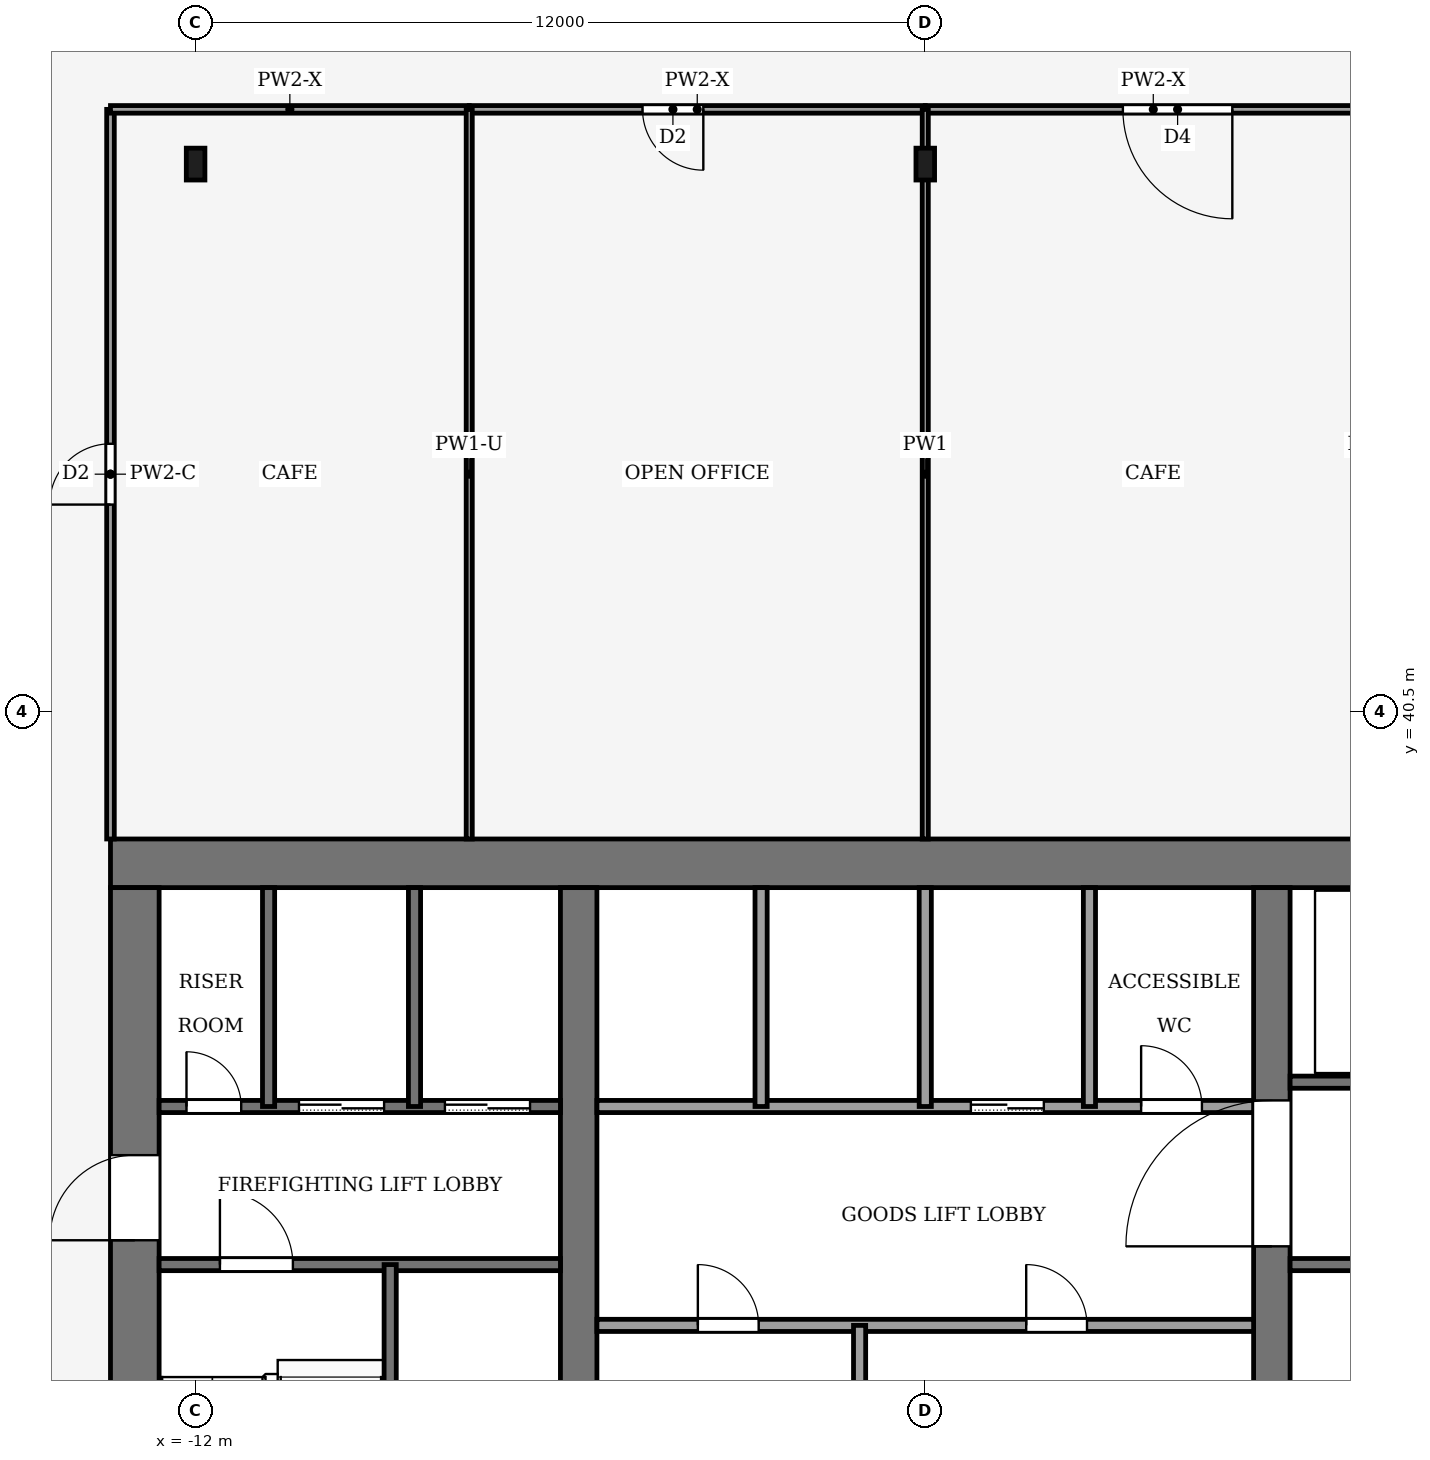
"""IFC4 building model, lengths in metres.
Left out: names, types, materials, properties, quantities, classifications, styles, units other than length and angle.
Written with IfcOpenShell. Run it as: python <this file> out.ifc"""

import sys

from ifc_helpers import new_model, si_unit, direction, frame, frame_2d, origin, origin_2d, place, context, subcontext, project, spatial, rectangle, i_section, extrude, element, fill, save


model = new_model("IFC4")
c1 = context("Model", 3, precision=1e-05, world=origin(), true_north=direction((0.0, 1.0)))
c2 = subcontext(c1, "Body", "Model", "MODEL_VIEW")
j1 = project(units=[si_unit("LENGTHUNIT", "METRE"), si_unit("PLANEANGLEUNIT", "RADIAN")], contexts=[c1])
p1 = place(None, origin())
s1 = spatial("IfcSite", under=j1, at=p1, CompositionType="ELEMENT")
p2 = place(p1, origin())
s2 = spatial("IfcBuilding", under=s1, at=p2, CompositionType="ELEMENT")
p3 = place(p2, frame((0.0, 0.0, 233.0)))
s3 = spatial("IfcBuildingStorey", under=s2, at=p3, CompositionType="ELEMENT", Elevation=233.0)
p4 = place(p3, frame((-13.4, 38.0, -0.13), z_axis=(0.0, 0.0, 1.0), x_axis=(1.0, 0.0, 0.0)))
e1 = element("IfcWall", 1, at=p4, inside=s3, PredefinedType="SHEAR", context=c2, shape_type="SweptSolid", body=[
    extrude(rectangle(XDim=26.8, YDim=0.8, at=frame_2d((13.4, 0.0))), origin(), (0.0, 0.0, 1.0), 5.0),
])
p5 = place(p3, frame((-13.0, 18.4, -0.13), z_axis=(0.0, 0.0, 1.0), x_axis=(0.0, 1.0, 0.0)))
e2 = element("IfcWall", 2, at=p5, inside=s3, PredefinedType="SHEAR", context=c2, shape_type="SweptSolid", body=[
    extrude(rectangle(XDim=19.2, YDim=0.8, at=frame_2d((9.6, 0.0))), origin(), (0.0, 0.0, 1.0), 5.0),
])
p6 = place(p5, frame((2.8, 0.0, 0.13)))
e3 = element("IfcOpeningElement", 3, at=p6, cuts=e2, PredefinedType="OPENING", context=c2, shape_type="SweptSolid", body=[
    extrude(rectangle(XDim=2.4, YDim=2.4, at=frame_2d((1.2, 1.2))), frame((0.0, 0.41, 0.0), z_axis=(0.0, -1.0, 0.0), x_axis=(1.0, 0.0, 0.0)), (0.0, 0.0, 1.0), 0.82),
])
p7 = place(p5, frame((13.4, 0.0, 0.13)))
e4 = element("IfcOpeningElement", 4, at=p7, cuts=e2, PredefinedType="OPENING", context=c2, shape_type="SweptSolid", body=[
    extrude(rectangle(XDim=1.4, YDim=2.2, at=frame_2d((0.7, 1.1))), frame((0.0, 0.41, 0.0), z_axis=(0.0, -1.0, 0.0), x_axis=(1.0, 0.0, 0.0)), (0.0, 0.0, 1.0), 0.82),
])
p8 = place(p3, frame((-5.7, 18.4, -0.13), z_axis=(0.0, 0.0, 1.0), x_axis=(0.0, 1.0, 0.0)))
e5 = element("IfcWall", 5, at=p8, inside=s3, PredefinedType="SHEAR", context=c2, shape_type="SweptSolid", body=[
    extrude(rectangle(XDim=19.2, YDim=0.6, at=frame_2d((9.6, 0.0))), origin(), (0.0, 0.0, 1.0), 5.0),
])
p9 = place(p8, frame((8.35, 0.0, 0.13)))
e6 = element("IfcOpeningElement", 6, at=p9, cuts=e5, PredefinedType="OPENING", context=c2, shape_type="SweptSolid", body=[
    extrude(rectangle(XDim=0.9, YDim=2.1, at=frame_2d((0.45, 1.05))), frame((0.0, 0.31, 0.0), z_axis=(0.0, -1.0, 0.0), x_axis=(1.0, 0.0, 0.0)), (0.0, 0.0, 1.0), 0.62),
])
p10 = place(p3, frame((5.7, 18.4, -0.13), z_axis=(0.0, 0.0, 1.0), x_axis=(0.0, 1.0, 0.0)))
e7 = element("IfcWall", 7, at=p10, inside=s3, PredefinedType="SHEAR", context=c2, shape_type="SweptSolid", body=[
    extrude(rectangle(XDim=19.2, YDim=0.6, at=frame_2d((9.6, 0.0))), origin(), (0.0, 0.0, 1.0), 5.0),
])
p11 = place(p10, frame((13.3, 0.0, 0.13)))
e8 = element("IfcOpeningElement", 8, at=p11, cuts=e7, PredefinedType="OPENING", context=c2, shape_type="SweptSolid", body=[
    extrude(rectangle(XDim=2.4, YDim=2.4, at=frame_2d((1.2, 1.2))), frame((0.0, 0.31, 0.0), z_axis=(0.0, -1.0, 0.0), x_axis=(1.0, 0.0, 0.0)), (0.0, 0.0, 1.0), 0.62),
])
for number, where, z_axis, x_axis in (
    (9, (-12.0, 49.5, 0.0), (0.0, 0.0, 1.0), (1.0, 0.0, 0.0)),
    (10, (0.0, 49.5, 0.0), (0.0, 0.0, 1.0), (1.0, 0.0, 0.0)),
):
    element("IfcColumn", number, at=place(p3, frame(where, z_axis=z_axis, x_axis=x_axis)), inside=s3, PredefinedType="COLUMN", context=c2, shape_type="SweptSolid", body=[
        extrude(i_section(OverallWidth=0.306, OverallDepth=0.524, WebThickness=0.012, FlangeThickness=0.04, FilletRadius=0.027, at=origin_2d()), origin(), (0.0, 0.0, 1.0), 5.0),
    ])
p12 = place(p3, frame((-5.4, 30.4, 0.0), z_axis=(0.0, 0.0, 1.0), x_axis=(1.0, 0.0, 0.0)))
e11 = element("IfcWall", 11, at=p12, inside=s3, PredefinedType="PARTITIONING", context=c2, shape_type="SweptSolid", body=[
    extrude(rectangle(XDim=10.8, YDim=0.2, at=frame_2d((5.4, 0.0))), origin(), (0.0, 0.0, 1.0), 4.87),
])
p13 = place(p12, frame((1.66, 0.0, 0.0)))
e12 = element("IfcOpeningElement", 12, at=p13, cuts=e11, PredefinedType="OPENING", context=c2, shape_type="SweptSolid", body=[
    extrude(rectangle(XDim=1.0, YDim=2.1, at=frame_2d((0.5, 1.05))), frame((0.0, 0.11, 0.0), z_axis=(0.0, -1.0, 0.0), x_axis=(1.0, 0.0, 0.0)), (0.0, 0.0, 1.0), 0.22),
])
p14 = place(p12, frame((7.06, 0.0, 0.0)))
e13 = element("IfcOpeningElement", 13, at=p14, cuts=e11, PredefinedType="OPENING", context=c2, shape_type="SweptSolid", body=[
    extrude(rectangle(XDim=1.0, YDim=2.1, at=frame_2d((0.5, 1.05))), frame((0.0, 0.11, 0.0), z_axis=(0.0, -1.0, 0.0), x_axis=(1.0, 0.0, 0.0)), (0.0, 0.0, 1.0), 0.22),
])
p15 = place(p3, frame((-12.6, 31.4, 0.0), z_axis=(0.0, 0.0, 1.0), x_axis=(1.0, 0.0, 0.0)))
e14 = element("IfcWall", 14, at=p15, inside=s3, PredefinedType="PARTITIONING", context=c2, shape_type="SweptSolid", body=[
    extrude(rectangle(XDim=6.6, YDim=0.2, at=frame_2d((3.3, 0.0))), origin(), (0.0, 0.0, 1.0), 4.87),
])
p16 = place(p15, frame((1.0, 0.0, 0.0)))
e15 = element("IfcOpeningElement", 15, at=p16, cuts=e14, PredefinedType="OPENING", context=c2, shape_type="SweptSolid", body=[
    extrude(rectangle(XDim=1.2, YDim=2.2, at=frame_2d((0.6, 1.1))), frame((0.0, 0.11, 0.0), z_axis=(0.0, -1.0, 0.0), x_axis=(1.0, 0.0, 0.0)), (0.0, 0.0, 1.0), 0.22),
])
p17 = place(p3, frame((6.0, 31.4, 0.0), z_axis=(0.0, 0.0, 1.0), x_axis=(1.0, 0.0, 0.0)))
e16 = element("IfcWall", 16, at=p17, inside=s3, PredefinedType="PARTITIONING", context=c2, shape_type="SweptSolid", body=[
    extrude(rectangle(XDim=6.6, YDim=0.2, at=frame_2d((3.3, 0.0))), origin(), (0.0, 0.0, 1.0), 4.87),
])
p18 = place(p3, frame((-12.6, 34.0, 0.0), z_axis=(0.0, 0.0, 1.0), x_axis=(1.0, 0.0, 0.0)))
e17 = element("IfcWall", 17, at=p18, inside=s3, PredefinedType="PARTITIONING", context=c2, shape_type="SweptSolid", body=[
    extrude(rectangle(XDim=6.6, YDim=0.2, at=frame_2d((3.3, 0.0))), origin(), (0.0, 0.0, 1.0), 4.87),
])
p19 = place(p18, frame((4.7, 0.0, 0.0)))
e18 = element("IfcOpeningElement", 18, at=p19, cuts=e17, PredefinedType="OPENING", context=c2, shape_type="SweptSolid", body=[
    extrude(rectangle(XDim=1.4, YDim=2.2, at=frame_2d((0.7, 1.1))), frame((0.0, 0.11, 0.0), z_axis=(0.0, -1.0, 0.0), x_axis=(1.0, 0.0, 0.0)), (0.0, 0.0, 1.0), 0.22),
])
p20 = place(p18, frame((2.3, 0.0, 0.0)))
e19 = element("IfcOpeningElement", 19, at=p20, cuts=e17, PredefinedType="OPENING", context=c2, shape_type="SweptSolid", body=[
    extrude(rectangle(XDim=1.4, YDim=2.2, at=frame_2d((0.7, 1.1))), frame((0.0, 0.11, 0.0), z_axis=(0.0, -1.0, 0.0), x_axis=(1.0, 0.0, 0.0)), (0.0, 0.0, 1.0), 0.22),
])
p21 = place(p18, frame((0.45, 0.0, 0.0)))
e20 = element("IfcOpeningElement", 20, at=p21, cuts=e17, PredefinedType="OPENING", context=c2, shape_type="SweptSolid", body=[
    extrude(rectangle(XDim=0.9, YDim=2.1, at=frame_2d((0.45, 1.05))), frame((0.0, 0.11, 0.0), z_axis=(0.0, -1.0, 0.0), x_axis=(1.0, 0.0, 0.0)), (0.0, 0.0, 1.0), 0.22),
])
p22 = place(p3, frame((-5.4, 34.0, 0.0), z_axis=(0.0, 0.0, 1.0), x_axis=(1.0, 0.0, 0.0)))
e21 = element("IfcWall", 21, at=p22, inside=s3, PredefinedType="PARTITIONING", context=c2, shape_type="SweptSolid", body=[
    extrude(rectangle(XDim=10.8, YDim=0.2, at=frame_2d((5.4, 0.0))), origin(), (0.0, 0.0, 1.0), 4.87),
])
p23 = place(p22, frame((6.15, 0.0, 0.0)))
e22 = element("IfcOpeningElement", 22, at=p23, cuts=e21, PredefinedType="OPENING", context=c2, shape_type="SweptSolid", body=[
    extrude(rectangle(XDim=1.2, YDim=2.2, at=frame_2d((0.6, 1.1))), frame((0.0, 0.11, 0.0), z_axis=(0.0, -1.0, 0.0), x_axis=(1.0, 0.0, 0.0)), (0.0, 0.0, 1.0), 0.22),
])
p24 = place(p22, frame((8.95, 0.0, 0.0)))
e23 = element("IfcOpeningElement", 23, at=p24, cuts=e21, PredefinedType="OPENING", context=c2, shape_type="SweptSolid", body=[
    extrude(rectangle(XDim=1.0, YDim=2.1, at=frame_2d((0.5, 1.05))), frame((0.0, 0.11, 0.0), z_axis=(0.0, -1.0, 0.0), x_axis=(1.0, 0.0, 0.0)), (0.0, 0.0, 1.0), 0.22),
])
p25 = place(p3, frame((6.0, 34.4, 0.0), z_axis=(0.0, 0.0, 1.0), x_axis=(1.0, 0.0, 0.0)))
e24 = element("IfcWall", 24, at=p25, inside=s3, PredefinedType="PARTITIONING", context=c2, shape_type="SweptSolid", body=[
    extrude(rectangle(XDim=6.6, YDim=0.2, at=frame_2d((3.3, 0.0))), origin(), (0.0, 0.0, 1.0), 4.87),
])
p26 = place(p25, frame((4.8, 0.0, 0.0)))
e25 = element("IfcOpeningElement", 25, at=p26, cuts=e24, PredefinedType="OPENING", context=c2, shape_type="SweptSolid", body=[
    extrude(rectangle(XDim=1.2, YDim=2.2, at=frame_2d((0.6, 1.1))), frame((0.0, 0.11, 0.0), z_axis=(0.0, -1.0, 0.0), x_axis=(1.0, 0.0, 0.0)), (0.0, 0.0, 1.0), 0.22),
])
p27 = place(p3, frame((-10.8, 34.0, 0.0), z_axis=(0.0, 0.0, 1.0), x_axis=(0.0, 1.0, 0.0)))
e26 = element("IfcWall", 26, at=p27, inside=s3, PredefinedType="PARTITIONING", context=c2, shape_type="SweptSolid", body=[
    extrude(rectangle(XDim=3.6, YDim=0.2, at=frame_2d((1.8, 0.0))), origin(), (0.0, 0.0, 1.0), 4.87),
])
p28 = place(p3, frame((-8.8, 24.0, 0.0), z_axis=(0.0, 0.0, 1.0), x_axis=(0.0, 1.0, 0.0)))
e27 = element("IfcWall", 27, at=p28, inside=s3, PredefinedType="PARTITIONING", context=c2, shape_type="SweptSolid", body=[
    extrude(rectangle(XDim=7.4, YDim=0.2, at=frame_2d((3.7, 0.0))), origin(), (0.0, 0.0, 1.0), 4.87),
])
for number, where, z_axis, x_axis in (
    (28, (-8.4, 34.0, 0.0), (0.0, 0.0, 1.0), (0.0, 1.0, 0.0)),
    (29, (-2.7, 34.0, 0.0), (0.0, 0.0, 1.0), (0.0, 1.0, 0.0)),
):
    element("IfcWall", number, at=place(p3, frame(where, z_axis=z_axis, x_axis=x_axis)), inside=s3, PredefinedType="PARTITIONING", context=c2, shape_type="SweptSolid", body=[
        extrude(rectangle(XDim=3.6, YDim=0.2, at=frame_2d((1.8, 0.0))), origin(), (0.0, 0.0, 1.0), 4.87),
    ])
p29 = place(p3, frame((-1.08, 28.0, 0.0), z_axis=(0.0, 0.0, 1.0), x_axis=(0.0, 1.0, 0.0)))
e30 = element("IfcWall", 30, at=p29, inside=s3, PredefinedType="PARTITIONING", context=c2, shape_type="SweptSolid", body=[
    extrude(rectangle(XDim=2.4, YDim=0.2, at=frame_2d((1.2, 0.0))), origin(), (0.0, 0.0, 1.0), 4.87),
])
for number, where, z_axis, x_axis in (
    (31, (0.0, 34.0, 0.0), (0.0, 0.0, 1.0), (0.0, 1.0, 0.0)),
    (32, (2.7, 34.0, 0.0), (0.0, 0.0, 1.0), (0.0, 1.0, 0.0)),
):
    element("IfcWall", number, at=place(p3, frame(where, z_axis=z_axis, x_axis=x_axis)), inside=s3, PredefinedType="PARTITIONING", context=c2, shape_type="SweptSolid", body=[
        extrude(rectangle(XDim=3.6, YDim=0.2, at=frame_2d((1.8, 0.0))), origin(), (0.0, 0.0, 1.0), 4.87),
    ])
p30 = place(p3, frame((-13.4, 38.4, 0.0), z_axis=(0.0, 0.0, 1.0), x_axis=(0.0, 1.0, 0.0)))
e33 = element("IfcWall", 33, at=p30, inside=s3, PredefinedType="PARTITIONING", context=c2, shape_type="SweptSolid", body=[
    extrude(rectangle(XDim=12.0, YDim=0.125, at=frame_2d((6.0, 0.0))), origin(), (0.0, 0.0, 1.0), 4.14),
])
p31 = place(p30, frame((5.5, 0.0, 0.0)))
e34 = element("IfcOpeningElement", 34, at=p31, cuts=e33, PredefinedType="OPENING", context=c2, shape_type="SweptSolid", body=[
    extrude(rectangle(XDim=1.0, YDim=2.1, at=frame_2d((0.5, 1.05))), frame((0.0, 0.073, 0.0), z_axis=(0.0, -1.0, 0.0), x_axis=(1.0, 0.0, 0.0)), (0.0, 0.0, 1.0), 0.145),
])
p32 = place(p3, frame((-7.5, 50.4, 0.0), z_axis=(0.0, 0.0, 1.0), x_axis=(-1.0, 0.0, 0.0)))
e35 = element("IfcWall", 35, at=p32, inside=s3, PredefinedType="PARTITIONING", context=c2, shape_type="SweptSolid", body=[
    extrude(rectangle(XDim=5.9, YDim=0.125, at=frame_2d((2.95, 0.0))), origin(), (0.0, 0.0, 1.0), 4.24),
])
p33 = place(p3, frame((0.0, 50.4, 0.0), z_axis=(0.0, 0.0, 1.0), x_axis=(-1.0, 0.0, 0.0)))
e36 = element("IfcWall", 36, at=p33, inside=s3, PredefinedType="PARTITIONING", context=c2, shape_type="SweptSolid", body=[
    extrude(rectangle(XDim=7.5, YDim=0.125, at=frame_2d((3.75, 0.0))), origin(), (0.0, 0.0, 1.0), 4.24),
])
p34 = place(p33, frame((3.65, 0.0, 0.0)))
e37 = element("IfcOpeningElement", 37, at=p34, cuts=e36, PredefinedType="OPENING", context=c2, shape_type="SweptSolid", body=[
    extrude(rectangle(XDim=1.0, YDim=2.1, at=frame_2d((0.5, 1.05))), frame((0.0, 0.073, 0.0), z_axis=(0.0, -1.0, 0.0), x_axis=(1.0, 0.0, 0.0)), (0.0, 0.0, 1.0), 0.145),
])
p35 = place(p3, frame((7.5, 50.4, 0.0), z_axis=(0.0, 0.0, 1.0), x_axis=(-1.0, 0.0, 0.0)))
e38 = element("IfcWall", 38, at=p35, inside=s3, PredefinedType="PARTITIONING", context=c2, shape_type="SweptSolid", body=[
    extrude(rectangle(XDim=7.5, YDim=0.125, at=frame_2d((3.75, 0.0))), origin(), (0.0, 0.0, 1.0), 4.24),
])
p36 = place(p35, frame((2.45, 0.0, 0.0)))
e39 = element("IfcOpeningElement", 39, at=p36, cuts=e38, PredefinedType="OPENING", context=c2, shape_type="SweptSolid", body=[
    extrude(rectangle(XDim=1.8, YDim=2.1, at=frame_2d((0.9, 1.05))), frame((0.0, 0.073, 0.0), z_axis=(0.0, -1.0, 0.0), x_axis=(1.0, 0.0, 0.0)), (0.0, 0.0, 1.0), 0.145),
])
p37 = place(p3, frame((-7.5, 38.4, 0.0), z_axis=(0.0, 0.0, 1.0), x_axis=(0.0, 1.0, 0.0)))
e40 = element("IfcWall", 40, at=p37, inside=s3, PredefinedType="PARTITIONING", context=c2, shape_type="SweptSolid", body=[
    extrude(rectangle(XDim=12.0, YDim=0.1, at=frame_2d((6.0, 0.0))), origin(), (0.0, 0.0, 1.0), 4.24),
])
p38 = place(p3, frame((0.0, 38.4, 0.0), z_axis=(0.0, 0.0, 1.0), x_axis=(0.0, 1.0, 0.0)))
e41 = element("IfcWall", 41, at=p38, inside=s3, PredefinedType="PARTITIONING", context=c2, shape_type="SweptSolid", body=[
    extrude(rectangle(XDim=12.0, YDim=0.1, at=frame_2d((6.0, 0.0))), origin(), (0.0, 0.0, 1.0), 4.29),
])
p39 = place(p23, origin())
e42 = element("IfcDoor", 42, at=p39, inside=s3, OperationType="SLIDING_TO_LEFT", PredefinedType="DOOR", context=c2, shape_type="SweptSolid", body=[
    extrude(rectangle(XDim=1.2, YDim=2.2, at=frame_2d((0.6, 1.1))), frame((0.0, 0.025, 0.0), z_axis=(0.0, -1.0, 0.0), x_axis=(1.0, 0.0, 0.0)), (0.0, 0.0, 1.0), 0.05),
])
fill(e22, e42)
p40 = place(p19, origin())
e43 = element("IfcDoor", 43, at=p40, inside=s3, OperationType="SLIDING_TO_LEFT", PredefinedType="DOOR", context=c2, shape_type="SweptSolid", body=[
    extrude(rectangle(XDim=1.4, YDim=2.2, at=frame_2d((0.7, 1.1))), frame((0.0, 0.025, 0.0), z_axis=(0.0, -1.0, 0.0), x_axis=(1.0, 0.0, 0.0)), (0.0, 0.0, 1.0), 0.05),
])
fill(e18, e43)
p41 = place(p20, origin())
e44 = element("IfcDoor", 44, at=p41, inside=s3, OperationType="SLIDING_TO_LEFT", PredefinedType="DOOR", context=c2, shape_type="SweptSolid", body=[
    extrude(rectangle(XDim=1.4, YDim=2.2, at=frame_2d((0.7, 1.1))), frame((0.0, 0.025, 0.0), z_axis=(0.0, -1.0, 0.0), x_axis=(1.0, 0.0, 0.0)), (0.0, 0.0, 1.0), 0.05),
])
fill(e19, e44)
p42 = place(p21, origin())
e45 = element("IfcDoor", 45, at=p42, inside=s3, OperationType="SINGLE_SWING_RIGHT", PredefinedType="DOOR", context=c2, shape_type="SweptSolid", body=[
    extrude(rectangle(XDim=0.9, YDim=2.1, at=frame_2d((0.45, 1.05))), frame((0.0, 0.025, 0.0), z_axis=(0.0, -1.0, 0.0), x_axis=(1.0, 0.0, 0.0)), (0.0, 0.0, 1.0), 0.05),
])
fill(e20, e45)
p43 = place(p13, origin())
e46 = element("IfcDoor", 46, at=p43, inside=s3, OperationType="SINGLE_SWING_RIGHT", PredefinedType="DOOR", context=c2, shape_type="SweptSolid", body=[
    extrude(rectangle(XDim=1.0, YDim=2.1, at=frame_2d((0.5, 1.05))), frame((0.0, 0.025, 0.0), z_axis=(0.0, -1.0, 0.0), x_axis=(1.0, 0.0, 0.0)), (0.0, 0.0, 1.0), 0.05),
])
fill(e12, e46)
p44 = place(p14, origin())
e47 = element("IfcDoor", 47, at=p44, inside=s3, OperationType="SINGLE_SWING_LEFT", PredefinedType="DOOR", context=c2, shape_type="SweptSolid", body=[
    extrude(rectangle(XDim=1.0, YDim=2.1, at=frame_2d((0.5, 1.05))), frame((0.0, 0.025, 0.0), z_axis=(0.0, -1.0, 0.0), x_axis=(1.0, 0.0, 0.0)), (0.0, 0.0, 1.0), 0.05),
])
fill(e13, e47)
p45 = place(p24, origin())
e48 = element("IfcDoor", 48, at=p45, inside=s3, OperationType="SINGLE_SWING_LEFT", PredefinedType="DOOR", context=c2, shape_type="SweptSolid", body=[
    extrude(rectangle(XDim=1.0, YDim=2.1, at=frame_2d((0.5, 1.05))), frame((0.0, 0.025, 0.0), z_axis=(0.0, -1.0, 0.0), x_axis=(1.0, 0.0, 0.0)), (0.0, 0.0, 1.0), 0.05),
])
fill(e23, e48)
p46 = place(p16, origin())
e49 = element("IfcDoor", 49, at=p46, inside=s3, OperationType="SINGLE_SWING_RIGHT", PredefinedType="DOOR", context=c2, shape_type="SweptSolid", body=[
    extrude(rectangle(XDim=1.2, YDim=2.2, at=frame_2d((0.6, 1.1))), frame((0.0, 0.025, 0.0), z_axis=(0.0, -1.0, 0.0), x_axis=(1.0, 0.0, 0.0)), (0.0, 0.0, 1.0), 0.05),
])
fill(e15, e49)
p47 = place(p11, origin())
e50 = element("IfcDoor", 50, at=p47, inside=s3, OperationType="DOUBLE_DOOR_SINGLE_SWING", PredefinedType="DOOR", context=c2, shape_type="SweptSolid", body=[
    extrude(rectangle(XDim=2.4, YDim=2.4, at=frame_2d((1.2, 1.2))), frame((0.0, 0.025, 0.0), z_axis=(0.0, -1.0, 0.0), x_axis=(1.0, 0.0, 0.0)), (0.0, 0.0, 1.0), 0.05),
])
fill(e8, e50)
p48 = place(p7, origin())
e51 = element("IfcDoor", 51, at=p48, inside=s3, OperationType="SINGLE_SWING_RIGHT", PredefinedType="DOOR", context=c2, shape_type="SweptSolid", body=[
    extrude(rectangle(XDim=1.4, YDim=2.2, at=frame_2d((0.7, 1.1))), frame((0.0, 0.025, 0.0), z_axis=(0.0, -1.0, 0.0), x_axis=(1.0, 0.0, 0.0)), (0.0, 0.0, 1.0), 0.05),
])
fill(e4, e51)
p49 = place(p31, origin())
e52 = element("IfcDoor", 52, at=p49, inside=s3, OperationType="SINGLE_SWING_LEFT", PredefinedType="DOOR", context=c2, shape_type="SweptSolid", body=[
    extrude(rectangle(XDim=1.0, YDim=2.1, at=frame_2d((0.5, 1.05))), frame((0.0, 0.025, 0.0), z_axis=(0.0, -1.0, 0.0), x_axis=(1.0, 0.0, 0.0)), (0.0, 0.0, 1.0), 0.05),
])
fill(e34, e52)
p50 = place(p34, origin())
e53 = element("IfcDoor", 53, at=p50, inside=s3, OperationType="SINGLE_SWING_RIGHT", PredefinedType="DOOR", context=c2, shape_type="SweptSolid", body=[
    extrude(rectangle(XDim=1.0, YDim=2.1, at=frame_2d((0.5, 1.05))), frame((0.0, 0.025, 0.0), z_axis=(0.0, -1.0, 0.0), x_axis=(1.0, 0.0, 0.0)), (0.0, 0.0, 1.0), 0.05),
])
fill(e37, e53)
p51 = place(p36, origin())
e54 = element("IfcDoor", 54, at=p51, inside=s3, OperationType="DOUBLE_DOOR_SINGLE_SWING", PredefinedType="DOOR", context=c2, shape_type="SweptSolid", body=[
    extrude(rectangle(XDim=1.8, YDim=2.1, at=frame_2d((0.9, 1.05))), frame((0.0, 0.025, 0.0), z_axis=(0.0, -1.0, 0.0), x_axis=(1.0, 0.0, 0.0)), (0.0, 0.0, 1.0), 0.05),
])
fill(e39, e54)
save(model, sys.argv[1])
